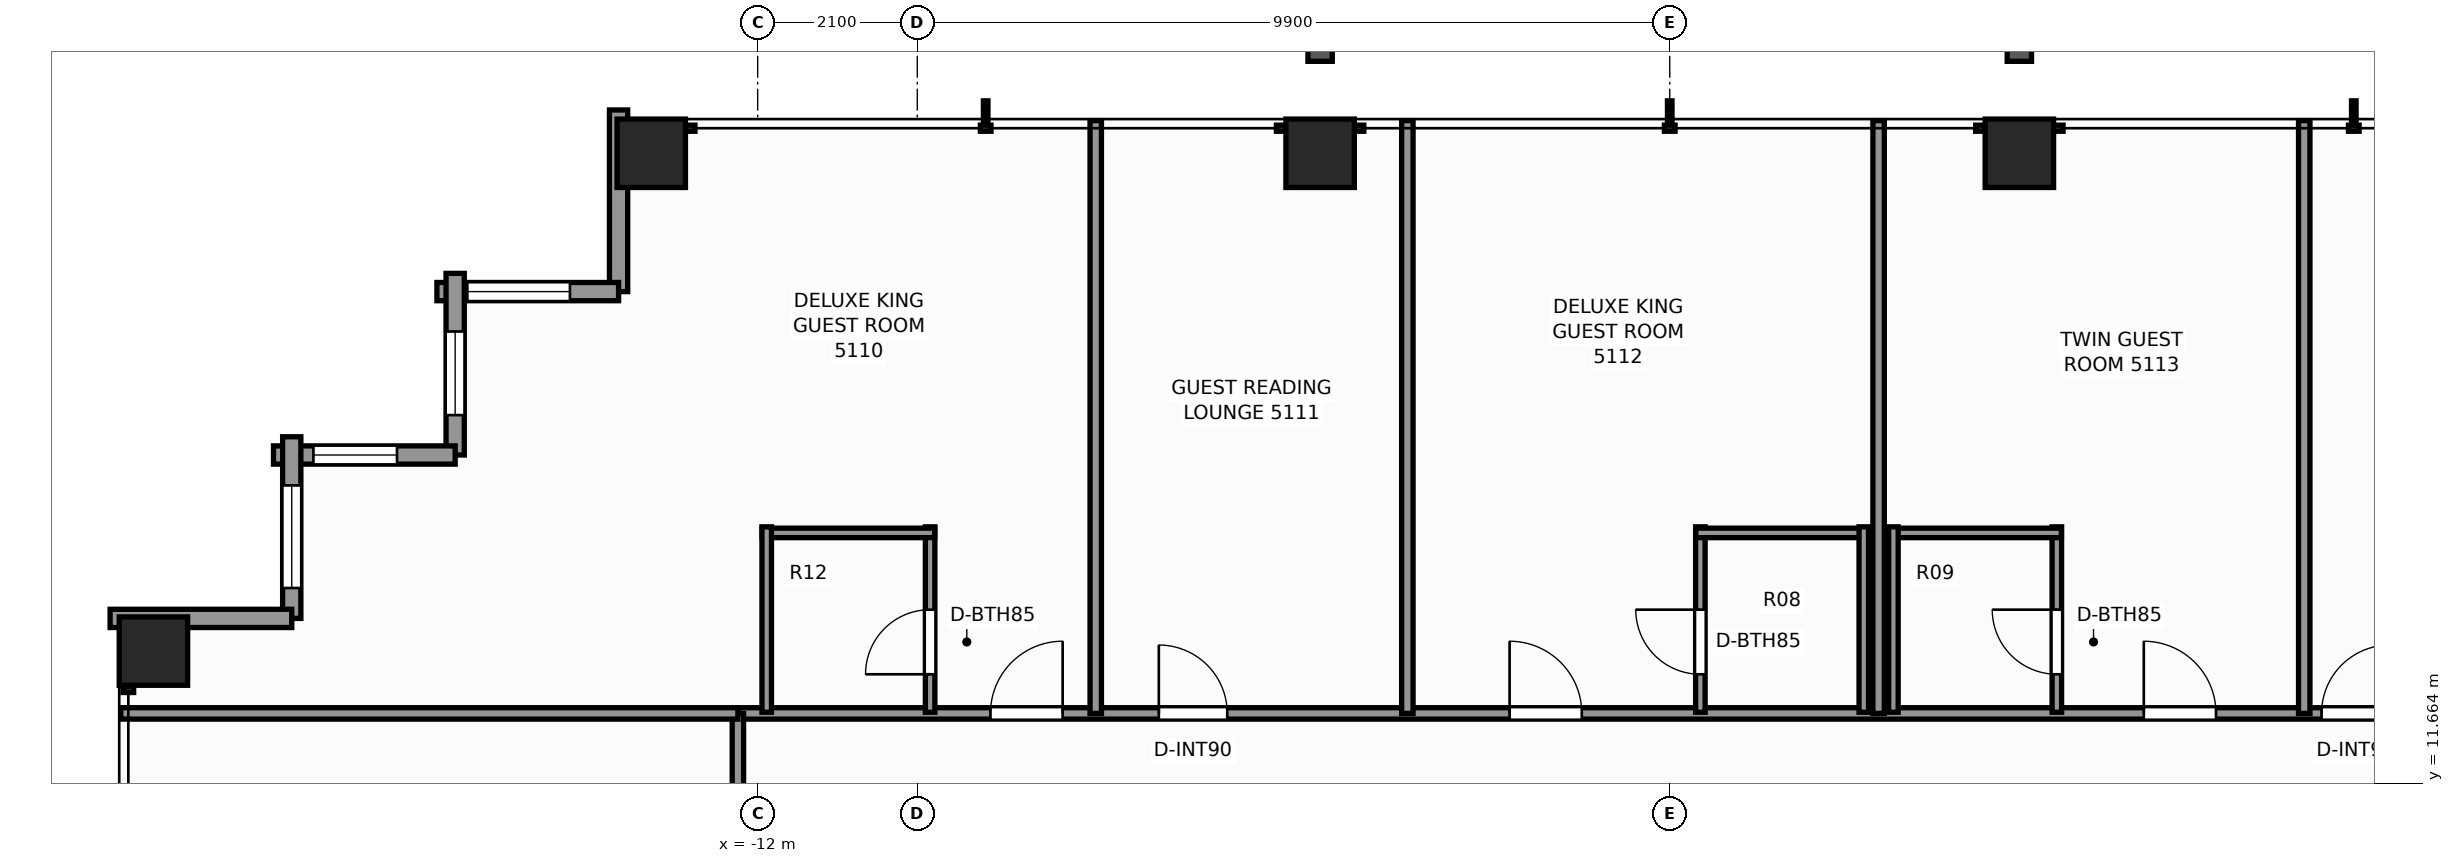
"""IFC4 building model, lengths in metres.
Left out: names, types, materials, properties, quantities, classifications, styles, units other than length and angle.
Written with IfcOpenShell. Run it as: python <this file> out.ifc"""

import sys

from ifc_helpers import new_model, si_unit, direction, frame, frame_2d, origin, origin_2d, place, context, subcontext, project, spatial, rectangle, extrude, element, fill, save


model = new_model("IFC4")
c1 = context("Model", 3, precision=1e-05, world=origin(), true_north=direction((0.0, 1.0)))
c2 = subcontext(c1, "Body", "Model", "MODEL_VIEW")
j1 = project(units=[si_unit("LENGTHUNIT", "METRE"), si_unit("PLANEANGLEUNIT", "RADIAN")], contexts=[c1])
p1 = place(None, origin())
s1 = spatial("IfcSite", under=j1, at=p1, CompositionType="ELEMENT")
p2 = place(p1, origin())
s2 = spatial("IfcBuilding", under=s1, at=p2, CompositionType="ELEMENT")
p3 = place(p2, frame((0.0, 0.0, 176.7)))
s3 = spatial("IfcBuildingStorey", under=s2, at=p3, CompositionType="ELEMENT", Elevation=176.7)
for number, where, z_axis, x_axis in (
    (1, (-13.4, 19.95, 0.0), (0.0, 0.0, 1.0), (1.0, 0.0, 0.0)),
    (2, (-4.6, 19.95, 0.0), (0.0, 0.0, 1.0), (1.0, 0.0, 0.0)),
    (3, (4.6, 19.95, 0.0), (0.0, 0.0, 1.0), (1.0, 0.0, 0.0)),
    (4, (-19.95, 13.4, 0.0), (0.0, 0.0, 1.0), (1.0, 0.0, 0.0)),
):
    element("IfcColumn", number, at=place(p3, frame(where, z_axis=z_axis, x_axis=x_axis)), inside=s3, PredefinedType="COLUMN", context=c2, shape_type="SweptSolid", body=[
        extrude(rectangle(XDim=0.9, YDim=0.9, at=origin_2d()), origin(), (0.0, 0.0, 1.0), 3.3),
    ])
p4 = place(p3, frame((-13.83, 18.13, 0.0), z_axis=(0.0, 0.0, 1.0), x_axis=(0.0, 1.0, 0.0)))
e5 = element("IfcWall", 5, at=p4, inside=s3, PredefinedType="STANDARD", context=c2, shape_type="SweptSolid", body=[
    extrude(rectangle(XDim=2.39, YDim=0.24, at=frame_2d((1.195, 0.0))), origin(), (0.0, 0.0, 1.0), 2.463),
])
p5 = place(p3, frame((-16.22, 18.13, 0.0), z_axis=(0.0, 0.0, 1.0), x_axis=(1.0, 0.0, 0.0)))
e6 = element("IfcWall", 6, at=p5, inside=s3, PredefinedType="STANDARD", context=c2, shape_type="SweptSolid", body=[
    extrude(rectangle(XDim=2.39, YDim=0.24, at=frame_2d((1.195, 0.0))), origin(), (0.0, 0.0, 1.0), 2.463),
])
p6 = place(p5, frame((0.4, 0.0, 0.65)))
e7 = element("IfcOpeningElement", 7, at=p6, cuts=e6, PredefinedType="OPENING", context=c2, shape_type="SweptSolid", body=[
    extrude(rectangle(XDim=1.35, YDim=1.55, at=frame_2d((0.675, 0.775))), frame((0.0, 0.13, 0.0), z_axis=(0.0, -1.0, 0.0), x_axis=(1.0, 0.0, 0.0)), (0.0, 0.0, 1.0), 0.26),
])
p7 = place(p3, frame((-15.98, 15.98, 0.0), z_axis=(0.0, 0.0, 1.0), x_axis=(0.0, 1.0, 0.0)))
e8 = element("IfcWall", 8, at=p7, inside=s3, PredefinedType="STANDARD", context=c2, shape_type="SweptSolid", body=[
    extrude(rectangle(XDim=2.39, YDim=0.24, at=frame_2d((1.195, 0.0))), origin(), (0.0, 0.0, 1.0), 2.463),
])
p8 = place(p7, frame((0.525, 0.0, 0.65)))
e9 = element("IfcOpeningElement", 9, at=p8, cuts=e8, PredefinedType="OPENING", context=c2, shape_type="SweptSolid", body=[
    extrude(rectangle(XDim=1.1, YDim=1.45, at=frame_2d((0.55, 0.725))), frame((0.0, 0.13, 0.0), z_axis=(0.0, -1.0, 0.0), x_axis=(1.0, 0.0, 0.0)), (0.0, 0.0, 1.0), 0.26),
])
p9 = place(p3, frame((-18.37, 15.98, 0.0), z_axis=(0.0, 0.0, 1.0), x_axis=(1.0, 0.0, 0.0)))
e10 = element("IfcWall", 10, at=p9, inside=s3, PredefinedType="STANDARD", context=c2, shape_type="SweptSolid", body=[
    extrude(rectangle(XDim=2.39, YDim=0.24, at=frame_2d((1.195, 0.0))), origin(), (0.0, 0.0, 1.0), 2.463),
])
p10 = place(p9, frame((0.525, 0.0, 0.65)))
e11 = element("IfcOpeningElement", 11, at=p10, cuts=e10, PredefinedType="OPENING", context=c2, shape_type="SweptSolid", body=[
    extrude(rectangle(XDim=1.1, YDim=1.45, at=frame_2d((0.55, 0.725))), frame((0.0, 0.13, 0.0), z_axis=(0.0, -1.0, 0.0), x_axis=(1.0, 0.0, 0.0)), (0.0, 0.0, 1.0), 0.26),
])
p11 = place(p3, frame((-18.13, 13.83, 0.0), z_axis=(0.0, 0.0, 1.0), x_axis=(0.0, 1.0, 0.0)))
e12 = element("IfcWall", 12, at=p11, inside=s3, PredefinedType="STANDARD", context=c2, shape_type="SweptSolid", body=[
    extrude(rectangle(XDim=2.39, YDim=0.24, at=frame_2d((1.195, 0.0))), origin(), (0.0, 0.0, 1.0), 2.463),
])
p12 = place(p11, frame((0.4, 0.0, 0.65)))
e13 = element("IfcOpeningElement", 13, at=p12, cuts=e12, PredefinedType="OPENING", context=c2, shape_type="SweptSolid", body=[
    extrude(rectangle(XDim=1.35, YDim=1.55, at=frame_2d((0.675, 0.775))), frame((0.0, 0.13, 0.0), z_axis=(0.0, -1.0, 0.0), x_axis=(1.0, 0.0, 0.0)), (0.0, 0.0, 1.0), 0.26),
])
p13 = place(p3, frame((-20.52, 13.83, 0.0), z_axis=(0.0, 0.0, 1.0), x_axis=(1.0, 0.0, 0.0)))
e14 = element("IfcWall", 14, at=p13, inside=s3, PredefinedType="STANDARD", context=c2, shape_type="SweptSolid", body=[
    extrude(rectangle(XDim=2.39, YDim=0.24, at=frame_2d((1.195, 0.0))), origin(), (0.0, 0.0, 1.0), 2.463),
])
p14 = place(p3, frame((-12.26, 12.58, 0.0), z_axis=(0.0, 0.0, 1.0), x_axis=(1.0, 0.0, 0.0)))
e15 = element("IfcWall", 15, at=p14, inside=s3, PredefinedType="PARTITIONING", context=c2, shape_type="SweptSolid", body=[
    extrude(rectangle(XDim=24.84, YDim=0.15, at=frame_2d((12.42, 0.0))), origin(), (0.0, 0.0, 1.0), 2.369),
])
p15 = place(p14, frame((3.323, 0.0, 0.0)))
e16 = element("IfcOpeningElement", 16, at=p15, cuts=e15, PredefinedType="OPENING", context=c2, shape_type="SweptSolid", body=[
    extrude(rectangle(XDim=0.95, YDim=2.06, at=frame_2d((0.475, 1.03))), frame((0.0, 0.085, 0.0), z_axis=(0.0, -1.0, 0.0), x_axis=(1.0, 0.0, 0.0)), (0.0, 0.0, 1.0), 0.17),
])
p16 = place(p14, frame((5.538, 0.0, 0.0)))
e17 = element("IfcOpeningElement", 17, at=p16, cuts=e15, PredefinedType="OPENING", context=c2, shape_type="SweptSolid", body=[
    extrude(rectangle(XDim=0.9, YDim=2.06, at=frame_2d((0.45, 1.03))), frame((0.0, 0.085, 0.0), z_axis=(0.0, -1.0, 0.0), x_axis=(1.0, 0.0, 0.0)), (0.0, 0.0, 1.0), 0.17),
])
p17 = place(p14, frame((10.153, 0.0, 0.0)))
e18 = element("IfcOpeningElement", 18, at=p17, cuts=e15, PredefinedType="OPENING", context=c2, shape_type="SweptSolid", body=[
    extrude(rectangle(XDim=0.95, YDim=2.06, at=frame_2d((0.475, 1.03))), frame((0.0, 0.085, 0.0), z_axis=(0.0, -1.0, 0.0), x_axis=(1.0, 0.0, 0.0)), (0.0, 0.0, 1.0), 0.17),
])
p18 = place(p14, frame((18.497, 0.0, 0.0)))
e19 = element("IfcOpeningElement", 19, at=p18, cuts=e15, PredefinedType="OPENING", context=c2, shape_type="SweptSolid", body=[
    extrude(rectangle(XDim=0.95, YDim=2.06, at=frame_2d((0.475, 1.03))), frame((0.0, 0.085, 0.0), z_axis=(0.0, -1.0, 0.0), x_axis=(1.0, 0.0, 0.0)), (0.0, 0.0, 1.0), 0.17),
])
p19 = place(p14, frame((20.836, 0.0, 0.0)))
e20 = element("IfcOpeningElement", 20, at=p19, cuts=e15, PredefinedType="OPENING", context=c2, shape_type="SweptSolid", body=[
    extrude(rectangle(XDim=0.9, YDim=2.06, at=frame_2d((0.45, 1.03))), frame((0.0, 0.085, 0.0), z_axis=(0.0, -1.0, 0.0), x_axis=(1.0, 0.0, 0.0)), (0.0, 0.0, 1.0), 0.17),
])
p20 = place(p3, frame((-12.26, -12.26, 0.0), z_axis=(0.0, 0.0, 1.0), x_axis=(0.0, 1.0, 0.0)))
e21 = element("IfcWall", 21, at=p20, inside=s3, PredefinedType="PARTITIONING", context=c2, shape_type="SweptSolid", body=[
    extrude(rectangle(XDim=24.84, YDim=0.15, at=frame_2d((12.42, 0.0))), origin(), (0.0, 0.0, 1.0), 2.369),
])
p21 = place(p20, frame((3.229, 0.0, 0.0)))
e22 = element("IfcOpeningElement", 22, at=p21, cuts=e21, PredefinedType="OPENING", context=c2, shape_type="SweptSolid", body=[
    extrude(rectangle(XDim=0.95, YDim=2.06, at=frame_2d((0.475, 1.03))), frame((0.0, 0.085, 0.0), z_axis=(0.0, -1.0, 0.0), x_axis=(1.0, 0.0, 0.0)), (0.0, 0.0, 1.0), 0.17),
])
p22 = place(p20, frame((13.815, 0.0, 0.0)))
e23 = element("IfcOpeningElement", 23, at=p22, cuts=e21, PredefinedType="OPENING", context=c2, shape_type="SweptSolid", body=[
    extrude(rectangle(XDim=0.95, YDim=2.06, at=frame_2d((0.475, 1.03))), frame((0.0, 0.085, 0.0), z_axis=(0.0, -1.0, 0.0), x_axis=(1.0, 0.0, 0.0)), (0.0, 0.0, 1.0), 0.17),
])
p23 = place(p20, frame((20.793, 0.0, 0.0)))
e24 = element("IfcOpeningElement", 24, at=p23, cuts=e21, PredefinedType="OPENING", context=c2, shape_type="SweptSolid", body=[
    extrude(rectangle(XDim=0.95, YDim=2.06, at=frame_2d((0.475, 1.03))), frame((0.0, 0.085, 0.0), z_axis=(0.0, -1.0, 0.0), x_axis=(1.0, 0.0, 0.0)), (0.0, 0.0, 1.0), 0.17),
])
p24 = place(p3, frame((-20.38, 12.58, 0.0), z_axis=(0.0, 0.0, 1.0), x_axis=(1.0, 0.0, 0.0)))
e25 = element("IfcWall", 25, at=p24, inside=s3, PredefinedType="PARTITIONING", context=c2, shape_type="SweptSolid", body=[
    extrude(rectangle(XDim=8.12, YDim=0.15, at=frame_2d((4.06, 0.0))), origin(), (0.0, 0.0, 1.0), 2.369),
])
p25 = place(p3, frame((-7.552, 12.58, 0.0), z_axis=(0.0, 0.0, 1.0), x_axis=(0.0, 1.0, 0.0)))
e26 = element("IfcWall", 26, at=p25, inside=s3, PredefinedType="PARTITIONING", context=c2, shape_type="SweptSolid", body=[
    extrude(rectangle(XDim=7.8, YDim=0.15, at=frame_2d((3.9, 0.0))), origin(), (0.0, 0.0, 1.0), 2.453),
])
p26 = place(p3, frame((-9.731, 12.595, 0.0), z_axis=(0.0, 0.0, 1.0), x_axis=(0.0, 1.0, 0.0)))
e27 = element("IfcWall", 27, at=p26, inside=s3, PredefinedType="PARTITIONING", context=c2, shape_type="SweptSolid", body=[
    extrude(rectangle(XDim=2.44, YDim=0.125, at=frame_2d((1.22, 0.0))), origin(), (0.0, 0.0, 1.0), 3.08),
])
p27 = place(p26, frame((0.5, 0.0, 0.0)))
e28 = element("IfcOpeningElement", 28, at=p27, cuts=e27, PredefinedType="OPENING", context=c2, shape_type="SweptSolid", body=[
    extrude(rectangle(XDim=0.85, YDim=2.03, at=frame_2d((0.425, 1.015))), frame((0.0, 0.073, 0.0), z_axis=(0.0, -1.0, 0.0), x_axis=(1.0, 0.0, 0.0)), (0.0, 0.0, 1.0), 0.145),
])
p28 = place(p3, frame((-11.941, 14.955, 0.0), z_axis=(0.0, 0.0, 1.0), x_axis=(1.0, 0.0, 0.0)))
e29 = element("IfcWall", 29, at=p28, inside=s3, PredefinedType="PARTITIONING", context=c2, shape_type="SweptSolid", body=[
    extrude(rectangle(XDim=2.27, YDim=0.125, at=frame_2d((1.135, 0.0))), origin(), (0.0, 0.0, 1.0), 2.369),
])
p29 = place(p3, frame((-11.881, 12.595, 0.0), z_axis=(0.0, 0.0, 1.0), x_axis=(0.0, 1.0, 0.0)))
e30 = element("IfcWall", 30, at=p29, inside=s3, PredefinedType="PARTITIONING", context=c2, shape_type="SweptSolid", body=[
    extrude(rectangle(XDim=2.44, YDim=0.125, at=frame_2d((1.22, 0.0))), origin(), (0.0, 0.0, 1.0), 2.369),
])
for number, where, z_axis, x_axis in (
    (31, (-3.452, 12.58, 0.0), (0.0, 0.0, 1.0), (0.0, 1.0, 0.0)),
    (32, (2.748, 12.58, 0.0), (0.0, 0.0, 1.0), (0.0, 1.0, 0.0)),
):
    element("IfcWall", number, at=place(p3, frame(where, z_axis=z_axis, x_axis=x_axis)), inside=s3, PredefinedType="PARTITIONING", context=c2, shape_type="SweptSolid", body=[
        extrude(rectangle(XDim=7.8, YDim=0.15, at=frame_2d((3.9, 0.0))), origin(), (0.0, 0.0, 1.0), 2.453),
    ])
p30 = place(p3, frame((0.403, 12.595, 0.0), z_axis=(0.0, 0.0, 1.0), x_axis=(0.0, 1.0, 0.0)))
e33 = element("IfcWall", 33, at=p30, inside=s3, PredefinedType="PARTITIONING", context=c2, shape_type="SweptSolid", body=[
    extrude(rectangle(XDim=2.44, YDim=0.125, at=frame_2d((1.22, 0.0))), origin(), (0.0, 0.0, 1.0), 3.08),
])
p31 = place(p30, frame((0.5, 0.0, 0.0)))
e34 = element("IfcOpeningElement", 34, at=p31, cuts=e33, PredefinedType="OPENING", context=c2, shape_type="SweptSolid", body=[
    extrude(rectangle(XDim=0.85, YDim=2.03, at=frame_2d((0.425, 1.015))), frame((0.0, 0.073, 0.0), z_axis=(0.0, -1.0, 0.0), x_axis=(1.0, 0.0, 0.0)), (0.0, 0.0, 1.0), 0.145),
])
p32 = place(p3, frame((0.343, 14.955, 0.0), z_axis=(0.0, 0.0, 1.0), x_axis=(1.0, 0.0, 0.0)))
e35 = element("IfcWall", 35, at=p32, inside=s3, PredefinedType="PARTITIONING", context=c2, shape_type="SweptSolid", body=[
    extrude(rectangle(XDim=2.27, YDim=0.125, at=frame_2d((1.135, 0.0))), origin(), (0.0, 0.0, 1.0), 3.08),
])
p33 = place(p3, frame((2.553, 12.595, 0.0), z_axis=(0.0, 0.0, 1.0), x_axis=(0.0, 1.0, 0.0)))
e36 = element("IfcWall", 36, at=p33, inside=s3, PredefinedType="PARTITIONING", context=c2, shape_type="SweptSolid", body=[
    extrude(rectangle(XDim=2.44, YDim=0.125, at=frame_2d((1.22, 0.0))), origin(), (0.0, 0.0, 1.0), 3.08),
])
p34 = place(p3, frame((8.348, 12.58, 0.0), z_axis=(0.0, 0.0, 1.0), x_axis=(0.0, 1.0, 0.0)))
e37 = element("IfcWall", 37, at=p34, inside=s3, PredefinedType="PARTITIONING", context=c2, shape_type="SweptSolid", body=[
    extrude(rectangle(XDim=7.8, YDim=0.15, at=frame_2d((3.9, 0.0))), origin(), (0.0, 0.0, 1.0), 2.453),
])
p35 = place(p3, frame((5.093, 12.595, 0.0), z_axis=(0.0, 0.0, 1.0), x_axis=(0.0, 1.0, 0.0)))
e38 = element("IfcWall", 38, at=p35, inside=s3, PredefinedType="PARTITIONING", context=c2, shape_type="SweptSolid", body=[
    extrude(rectangle(XDim=2.44, YDim=0.125, at=frame_2d((1.22, 0.0))), origin(), (0.0, 0.0, 1.0), 3.08),
])
p36 = place(p35, frame((0.5, 0.0, 0.0)))
e39 = element("IfcOpeningElement", 39, at=p36, cuts=e38, PredefinedType="OPENING", context=c2, shape_type="SweptSolid", body=[
    extrude(rectangle(XDim=0.85, YDim=2.03, at=frame_2d((0.425, 1.015))), frame((0.0, 0.073, 0.0), z_axis=(0.0, -1.0, 0.0), x_axis=(1.0, 0.0, 0.0)), (0.0, 0.0, 1.0), 0.145),
])
p37 = place(p3, frame((2.883, 14.955, 0.0), z_axis=(0.0, 0.0, 1.0), x_axis=(1.0, 0.0, 0.0)))
e40 = element("IfcWall", 40, at=p37, inside=s3, PredefinedType="PARTITIONING", context=c2, shape_type="SweptSolid", body=[
    extrude(rectangle(XDim=2.27, YDim=0.125, at=frame_2d((1.135, 0.0))), origin(), (0.0, 0.0, 1.0), 2.369),
])
p38 = place(p3, frame((2.943, 12.595, 0.0), z_axis=(0.0, 0.0, 1.0), x_axis=(0.0, 1.0, 0.0)))
e41 = element("IfcWall", 41, at=p38, inside=s3, PredefinedType="PARTITIONING", context=c2, shape_type="SweptSolid", body=[
    extrude(rectangle(XDim=2.44, YDim=0.125, at=frame_2d((1.22, 0.0))), origin(), (0.0, 0.0, 1.0), 2.369),
])
p39 = place(p6, origin())
e42 = element("IfcWindow", 42, at=p39, inside=s3, PartitioningType="SINGLE_PANEL", PredefinedType="WINDOW", context=c2, shape_type="SweptSolid", body=[
    extrude(rectangle(XDim=1.35, YDim=1.55, at=frame_2d((0.675, 0.775))), frame((0.0, 0.03, 0.0), z_axis=(0.0, -1.0, 0.0), x_axis=(1.0, 0.0, 0.0)), (0.0, 0.0, 1.0), 0.06),
])
fill(e7, e42)
p40 = place(p8, origin())
e43 = element("IfcWindow", 43, at=p40, inside=s3, PartitioningType="SINGLE_PANEL", PredefinedType="WINDOW", context=c2, shape_type="SweptSolid", body=[
    extrude(rectangle(XDim=1.1, YDim=1.45, at=frame_2d((0.55, 0.725))), frame((0.0, 0.03, 0.0), z_axis=(0.0, -1.0, 0.0), x_axis=(1.0, 0.0, 0.0)), (0.0, 0.0, 1.0), 0.06),
])
fill(e9, e43)
p41 = place(p10, origin())
e44 = element("IfcWindow", 44, at=p41, inside=s3, PartitioningType="SINGLE_PANEL", PredefinedType="WINDOW", context=c2, shape_type="SweptSolid", body=[
    extrude(rectangle(XDim=1.1, YDim=1.45, at=frame_2d((0.55, 0.725))), frame((0.0, 0.03, 0.0), z_axis=(0.0, -1.0, 0.0), x_axis=(1.0, 0.0, 0.0)), (0.0, 0.0, 1.0), 0.06),
])
fill(e11, e44)
p42 = place(p12, origin())
e45 = element("IfcWindow", 45, at=p42, inside=s3, PartitioningType="SINGLE_PANEL", PredefinedType="WINDOW", context=c2, shape_type="SweptSolid", body=[
    extrude(rectangle(XDim=1.35, YDim=1.55, at=frame_2d((0.675, 0.775))), frame((0.0, 0.03, 0.0), z_axis=(0.0, -1.0, 0.0), x_axis=(1.0, 0.0, 0.0)), (0.0, 0.0, 1.0), 0.06),
])
fill(e13, e45)
p43 = place(p27, origin())
e46 = element("IfcDoor", 46, at=p43, inside=s3, OperationType="SINGLE_SWING_LEFT", PredefinedType="DOOR", context=c2, shape_type="SweptSolid", body=[
    extrude(rectangle(XDim=0.85, YDim=2.03, at=frame_2d((0.425, 1.015))), frame((0.0, 0.025, 0.0), z_axis=(0.0, -1.0, 0.0), x_axis=(1.0, 0.0, 0.0)), (0.0, 0.0, 1.0), 0.05),
])
fill(e28, e46)
p44 = place(p15, origin())
e47 = element("IfcDoor", 47, at=p44, inside=s3, OperationType="SINGLE_SWING_RIGHT", PredefinedType="DOOR", context=c2, shape_type="SweptSolid", body=[
    extrude(rectangle(XDim=0.95, YDim=2.06, at=frame_2d((0.475, 1.03))), frame((0.0, 0.025, 0.0), z_axis=(0.0, -1.0, 0.0), x_axis=(1.0, 0.0, 0.0)), (0.0, 0.0, 1.0), 0.05),
])
fill(e16, e47)
p45 = place(p16, origin())
e48 = element("IfcDoor", 48, at=p45, inside=s3, OperationType="SINGLE_SWING_LEFT", PredefinedType="DOOR", context=c2, shape_type="SweptSolid", body=[
    extrude(rectangle(XDim=0.9, YDim=2.06, at=frame_2d((0.45, 1.03))), frame((0.0, 0.025, 0.0), z_axis=(0.0, -1.0, 0.0), x_axis=(1.0, 0.0, 0.0)), (0.0, 0.0, 1.0), 0.05),
])
fill(e17, e48)
p46 = place(p31, origin())
e49 = element("IfcDoor", 49, at=p46, inside=s3, OperationType="SINGLE_SWING_RIGHT", PredefinedType="DOOR", context=c2, shape_type="SweptSolid", body=[
    extrude(rectangle(XDim=0.85, YDim=2.03, at=frame_2d((0.425, 1.015))), frame((0.0, 0.025, 0.0), z_axis=(0.0, -1.0, 0.0), x_axis=(1.0, 0.0, 0.0)), (0.0, 0.0, 1.0), 0.05),
])
fill(e34, e49)
p47 = place(p17, origin())
e50 = element("IfcDoor", 50, at=p47, inside=s3, OperationType="SINGLE_SWING_LEFT", PredefinedType="DOOR", context=c2, shape_type="SweptSolid", body=[
    extrude(rectangle(XDim=0.95, YDim=2.06, at=frame_2d((0.475, 1.03))), frame((0.0, 0.025, 0.0), z_axis=(0.0, -1.0, 0.0), x_axis=(1.0, 0.0, 0.0)), (0.0, 0.0, 1.0), 0.05),
])
fill(e18, e50)
p48 = place(p36, origin())
e51 = element("IfcDoor", 51, at=p48, inside=s3, OperationType="SINGLE_SWING_RIGHT", PredefinedType="DOOR", context=c2, shape_type="SweptSolid", body=[
    extrude(rectangle(XDim=0.85, YDim=2.03, at=frame_2d((0.425, 1.015))), frame((0.0, 0.025, 0.0), z_axis=(0.0, -1.0, 0.0), x_axis=(1.0, 0.0, 0.0)), (0.0, 0.0, 1.0), 0.05),
])
fill(e39, e51)
p49 = place(p18, origin())
e52 = element("IfcDoor", 52, at=p49, inside=s3, OperationType="SINGLE_SWING_LEFT", PredefinedType="DOOR", context=c2, shape_type="SweptSolid", body=[
    extrude(rectangle(XDim=0.95, YDim=2.06, at=frame_2d((0.475, 1.03))), frame((0.0, 0.025, 0.0), z_axis=(0.0, -1.0, 0.0), x_axis=(1.0, 0.0, 0.0)), (0.0, 0.0, 1.0), 0.05),
])
fill(e19, e52)
p50 = place(p19, origin())
e53 = element("IfcDoor", 53, at=p50, inside=s3, OperationType="SINGLE_SWING_RIGHT", PredefinedType="DOOR", context=c2, shape_type="SweptSolid", body=[
    extrude(rectangle(XDim=0.9, YDim=2.06, at=frame_2d((0.45, 1.03))), frame((0.0, 0.025, 0.0), z_axis=(0.0, -1.0, 0.0), x_axis=(1.0, 0.0, 0.0)), (0.0, 0.0, 1.0), 0.05),
])
fill(e20, e53)
save(model, sys.argv[1])
